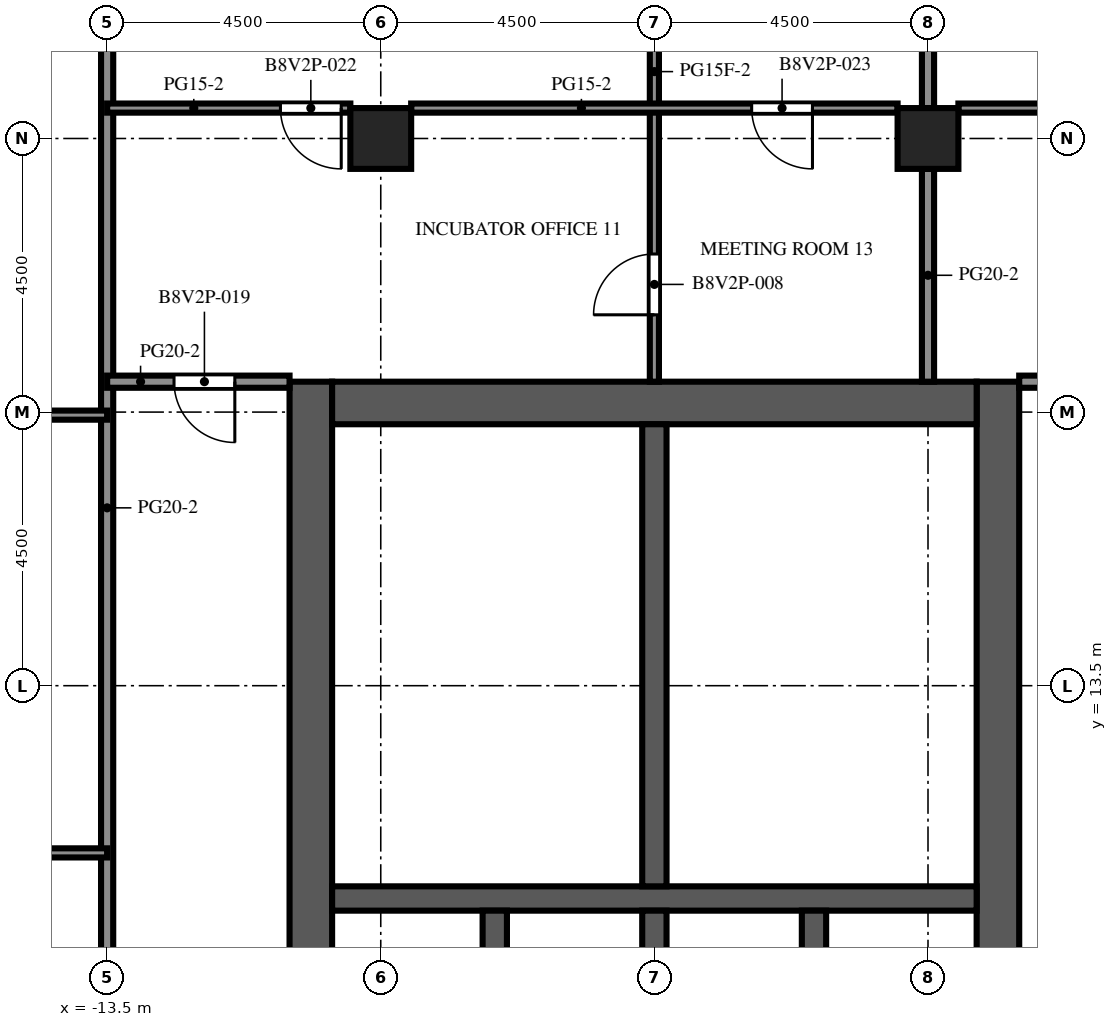
"""IFC4 building model, lengths in metres.
Left out: names, types, materials, properties, quantities, classifications, styles, units other than length and angle.
Written with IfcOpenShell. Run it as: python <this file> out.ifc"""

import sys

from ifc_helpers import new_model, si_unit, direction, frame, frame_2d, origin, origin_2d, place, context, subcontext, project, spatial, rectangle, extrude, element, fill, save


model = new_model("IFC4")
c1 = context("Model", 3, precision=1e-05, world=origin(), true_north=direction((0.0, 1.0)))
c2 = subcontext(c1, "Body", "Model", "MODEL_VIEW")
j1 = project(units=[si_unit("LENGTHUNIT", "METRE"), si_unit("PLANEANGLEUNIT", "RADIAN")], contexts=[c1])
p1 = place(None, origin())
s1 = spatial("IfcSite", under=j1, at=p1, CompositionType="ELEMENT")
p2 = place(p1, origin())
s2 = spatial("IfcBuilding", under=s1, at=p2, CompositionType="ELEMENT")
p3 = place(p2, frame((0.0, 0.0, 290.9)))
s3 = spatial("IfcBuildingStorey", under=s2, at=p3, CompositionType="ELEMENT", Elevation=290.9)
for number, where, z_axis, x_axis in (
    (1, (-9.0, 22.5, 0.0), (0.0, 0.0, 1.0), (1.0, 0.0, 0.0)),
    (2, (0.0, 22.5, 0.0), (0.0, 0.0, 1.0), (1.0, 0.0, 0.0)),
):
    element("IfcColumn", number, at=place(p3, frame(where, z_axis=z_axis, x_axis=x_axis)), inside=s3, PredefinedType="COLUMN", context=c2, shape_type="SweptSolid", body=[
        extrude(rectangle(XDim=1.0, YDim=1.0, at=origin_2d()), origin(), (0.0, 0.0, 1.0), 4.1),
    ])
p4 = place(p3, frame((-10.15, -9.0, 0.0), z_axis=(0.0, 0.0, 1.0), x_axis=(0.0, 1.0, 0.0)))
e3 = element("IfcWall", 3, at=p4, inside=s3, PredefinedType="SHEAR", context=c2, shape_type="SweptSolid", body=[
    extrude(rectangle(XDim=27.5, YDim=0.7, at=frame_2d((13.75, 0.0))), origin(), (0.0, 0.0, 1.0), 4.1),
])
p5 = place(p4, frame((12.55, 0.0, 0.0)))
e4 = element("IfcOpeningElement", 4, at=p5, cuts=e3, PredefinedType="OPENING", context=c2, shape_type="SweptSolid", body=[
    extrude(rectangle(XDim=2.4, YDim=2.4, at=frame_2d((1.2, 1.2))), frame((0.0, 0.36, 0.0), z_axis=(0.0, -1.0, 0.0), x_axis=(1.0, 0.0, 0.0)), (0.0, 0.0, 1.0), 0.72),
])
p6 = place(p4, frame((6.825, 0.0, 0.0)))
e5 = element("IfcOpeningElement", 5, at=p6, cuts=e3, PredefinedType="OPENING", context=c2, shape_type="SweptSolid", body=[
    extrude(rectangle(XDim=1.2, YDim=2.1, at=frame_2d((0.6, 1.05))), frame((0.0, 0.36, 0.0), z_axis=(0.0, -1.0, 0.0), x_axis=(1.0, 0.0, 0.0)), (0.0, 0.0, 1.0), 0.72),
])
p7 = place(p4, frame((19.475, 0.0, 0.0)))
e6 = element("IfcOpeningElement", 6, at=p7, cuts=e3, PredefinedType="OPENING", context=c2, shape_type="SweptSolid", body=[
    extrude(rectangle(XDim=1.2, YDim=2.1, at=frame_2d((0.6, 1.05))), frame((0.0, 0.36, 0.0), z_axis=(0.0, -1.0, 0.0), x_axis=(1.0, 0.0, 0.0)), (0.0, 0.0, 1.0), 0.72),
])
p8 = place(p3, frame((1.15, -9.0, 0.0), z_axis=(0.0, 0.0, 1.0), x_axis=(0.0, 1.0, 0.0)))
e7 = element("IfcWall", 7, at=p8, inside=s3, PredefinedType="SHEAR", context=c2, shape_type="SweptSolid", body=[
    extrude(rectangle(XDim=27.5, YDim=0.7, at=frame_2d((13.75, 0.0))), origin(), (0.0, 0.0, 1.0), 4.1),
])
p9 = place(p8, frame((12.55, 0.0, 0.0)))
e8 = element("IfcOpeningElement", 8, at=p9, cuts=e7, PredefinedType="OPENING", context=c2, shape_type="SweptSolid", body=[
    extrude(rectangle(XDim=2.4, YDim=2.4, at=frame_2d((1.2, 1.2))), frame((0.0, 0.36, 0.0), z_axis=(0.0, -1.0, 0.0), x_axis=(1.0, 0.0, 0.0)), (0.0, 0.0, 1.0), 0.72),
])
p10 = place(p8, frame((3.9, 0.0, 0.0)))
e9 = element("IfcOpeningElement", 9, at=p10, cuts=e7, PredefinedType="OPENING", context=c2, shape_type="SweptSolid", body=[
    extrude(rectangle(XDim=1.2, YDim=2.1, at=frame_2d((0.6, 1.05))), frame((0.0, 0.36, 0.0), z_axis=(0.0, -1.0, 0.0), x_axis=(1.0, 0.0, 0.0)), (0.0, 0.0, 1.0), 0.72),
])
p11 = place(p8, frame((22.4, 0.0, 0.0)))
e10 = element("IfcOpeningElement", 10, at=p11, cuts=e7, PredefinedType="OPENING", context=c2, shape_type="SweptSolid", body=[
    extrude(rectangle(XDim=1.2, YDim=2.1, at=frame_2d((0.6, 1.05))), frame((0.0, 0.36, 0.0), z_axis=(0.0, -1.0, 0.0), x_axis=(1.0, 0.0, 0.0)), (0.0, 0.0, 1.0), 0.72),
])
p12 = place(p3, frame((-9.8, 18.15, 0.0), z_axis=(0.0, 0.0, 1.0), x_axis=(1.0, 0.0, 0.0)))
e11 = element("IfcWall", 11, at=p12, inside=s3, PredefinedType="SHEAR", context=c2, shape_type="SweptSolid", body=[
    extrude(rectangle(XDim=10.6, YDim=0.7, at=frame_2d((5.3, 0.0))), origin(), (0.0, 0.0, 1.0), 4.1),
])
p13 = place(p3, frame((-9.8, 10.0, 0.0), z_axis=(0.0, 0.0, 1.0), x_axis=(1.0, 0.0, 0.0)))
e12 = element("IfcWall", 12, at=p13, inside=s3, PredefinedType="SHEAR", context=c2, shape_type="SweptSolid", body=[
    extrude(rectangle(XDim=10.6, YDim=0.4, at=frame_2d((5.3, 0.0))), origin(), (0.0, 0.0, 1.0), 4.1),
])
for number, where, z_axis, x_axis in (
    (13, (-7.125, 6.9, 0.0), (0.0, 0.0, 1.0), (0.0, 1.0, 0.0)),
    (14, (-4.5, 6.9, 0.0), (0.0, 0.0, 1.0), (0.0, 1.0, 0.0)),
    (15, (-1.875, 6.9, 0.0), (0.0, 0.0, 1.0), (0.0, 1.0, 0.0)),
):
    element("IfcWall", number, at=place(p3, frame(where, z_axis=z_axis, x_axis=x_axis)), inside=s3, PredefinedType="SHEAR", context=c2, shape_type="SweptSolid", body=[
        extrude(rectangle(XDim=2.9, YDim=0.4, at=frame_2d((1.45, 0.0))), origin(), (0.0, 0.0, 1.0), 4.1),
    ])
p14 = place(p3, frame((-4.5, 10.2, 0.0), z_axis=(0.0, 0.0, 1.0), x_axis=(0.0, 1.0, 0.0)))
e16 = element("IfcWall", 16, at=p14, inside=s3, PredefinedType="SHEAR", context=c2, shape_type="SweptSolid", body=[
    extrude(rectangle(XDim=7.6, YDim=0.4, at=frame_2d((3.8, 0.0))), origin(), (0.0, 0.0, 1.0), 4.1),
])
p15 = place(p3, frame((-0.6, 10.2, 0.0), z_axis=(0.0, 0.0, 1.0), x_axis=(0.0, 1.0, 0.0)))
e17 = element("IfcWall", 17, at=p15, inside=s3, PredefinedType="PARTITIONING", context=c2, shape_type="SweptSolid", body=[
    extrude(rectangle(XDim=2.28, YDim=0.1, at=frame_2d((1.14, 0.0))), origin(), (0.0, 0.0, 1.0), 3.5),
])
p16 = place(p15, frame((0.64, 0.0, 0.0)))
e18 = element("IfcOpeningElement", 18, at=p16, cuts=e17, PredefinedType="OPENING", context=c2, shape_type="SweptSolid", body=[
    extrude(rectangle(XDim=1.0, YDim=2.1, at=frame_2d((0.5, 1.05))), frame((0.0, 0.06, 0.0), z_axis=(0.0, -1.0, 0.0), x_axis=(1.0, 0.0, 0.0)), (0.0, 0.0, 1.0), 0.12),
])
p17 = place(p3, frame((-0.6, 12.48, 0.0), z_axis=(0.0, 0.0, 1.0), x_axis=(0.0, 1.0, 0.0)))
e19 = element("IfcWall", 19, at=p17, inside=s3, PredefinedType="PARTITIONING", context=c2, shape_type="SweptSolid", body=[
    extrude(rectangle(XDim=2.432, YDim=0.1, at=frame_2d((1.216, 0.0))), origin(), (0.0, 0.0, 1.0), 3.5),
])
p18 = place(p17, frame((0.716, 0.0, 0.0)))
e20 = element("IfcOpeningElement", 20, at=p18, cuts=e19, PredefinedType="OPENING", context=c2, shape_type="SweptSolid", body=[
    extrude(rectangle(XDim=1.0, YDim=2.1, at=frame_2d((0.5, 1.05))), frame((0.0, 0.06, 0.0), z_axis=(0.0, -1.0, 0.0), x_axis=(1.0, 0.0, 0.0)), (0.0, 0.0, 1.0), 0.12),
])
p19 = place(p3, frame((-0.6, 14.912, 0.0), z_axis=(0.0, 0.0, 1.0), x_axis=(0.0, 1.0, 0.0)))
e21 = element("IfcWall", 21, at=p19, inside=s3, PredefinedType="PARTITIONING", context=c2, shape_type="SweptSolid", body=[
    extrude(rectangle(XDim=2.888, YDim=0.1, at=frame_2d((1.444, 0.0))), origin(), (0.0, 0.0, 1.0), 3.5),
])
p20 = place(p19, frame((0.944, 0.0, 0.0)))
e22 = element("IfcOpeningElement", 22, at=p20, cuts=e21, PredefinedType="OPENING", context=c2, shape_type="SweptSolid", body=[
    extrude(rectangle(XDim=1.0, YDim=2.1, at=frame_2d((0.5, 1.05))), frame((0.0, 0.06, 0.0), z_axis=(0.0, -1.0, 0.0), x_axis=(1.0, 0.0, 0.0)), (0.0, 0.0, 1.0), 0.12),
])
for number, where, z_axis, x_axis in (
    (23, (-4.3, 12.48, 0.0), (0.0, 0.0, 1.0), (1.0, 0.0, 0.0)),
    (24, (-4.3, 14.912, 0.0), (0.0, 0.0, 1.0), (1.0, 0.0, 0.0)),
):
    element("IfcWall", number, at=place(p3, frame(where, z_axis=z_axis, x_axis=x_axis)), inside=s3, PredefinedType="PARTITIONING", context=c2, shape_type="SweptSolid", body=[
        extrude(rectangle(XDim=3.7, YDim=0.1, at=frame_2d((1.85, 0.0))), origin(), (0.0, 0.0, 1.0), 3.5),
    ])
p21 = place(p3, frame((-13.5, 6.25, 0.0), z_axis=(0.0, 0.0, 1.0), x_axis=(0.0, 1.0, 0.0)))
e25 = element("IfcWall", 25, at=p21, inside=s3, PredefinedType="PARTITIONING", context=c2, shape_type="SweptSolid", body=[
    extrude(rectangle(XDim=20.35, YDim=0.2, at=frame_2d((10.175, 0.0))), origin(), (0.0, 0.0, 1.0), 3.5),
])
p22 = place(p3, frame((-4.5, 26.6, 0.0), z_axis=(0.0, 0.0, 1.0), x_axis=(0.0, -1.0, 0.0)))
e26 = element("IfcWall", 26, at=p22, inside=s3, PredefinedType="PARTITIONING", context=c2, shape_type="SweptSolid", body=[
    extrude(rectangle(XDim=8.1, YDim=0.15, at=frame_2d((4.05, 0.0))), origin(), (0.0, 0.0, 1.0), 3.5),
])
p23 = place(p22, frame((6.0, 0.0, 0.0)))
e27 = element("IfcOpeningElement", 27, at=p23, cuts=e26, PredefinedType="OPENING", context=c2, shape_type="SweptSolid", body=[
    extrude(rectangle(XDim=1.0, YDim=2.1, at=frame_2d((0.5, 1.05))), frame((0.0, 0.085, 0.0), z_axis=(0.0, -1.0, 0.0), x_axis=(1.0, 0.0, 0.0)), (0.0, 0.0, 1.0), 0.17),
])
p24 = place(p3, frame((0.0, 18.5, 0.0), z_axis=(0.0, 0.0, 1.0), x_axis=(0.0, 1.0, 0.0)))
e28 = element("IfcWall", 28, at=p24, inside=s3, PredefinedType="PARTITIONING", context=c2, shape_type="SweptSolid", body=[
    extrude(rectangle(XDim=3.5, YDim=0.2, at=frame_2d((1.75, 0.0))), origin(), (0.0, 0.0, 1.0), 3.5),
])
p25 = place(p3, frame((0.0, 23.0, 0.0), z_axis=(0.0, 0.0, 1.0), x_axis=(0.0, 1.0, 0.0)))
e29 = element("IfcWall", 29, at=p25, inside=s3, PredefinedType="PARTITIONING", context=c2, shape_type="SweptSolid", body=[
    extrude(rectangle(XDim=3.6, YDim=0.2, at=frame_2d((1.8, 0.0))), origin(), (0.0, 0.0, 1.0), 3.5),
])
p26 = place(p3, frame((-22.35, 10.75, 0.0), z_axis=(0.0, 0.0, 1.0), x_axis=(1.0, 0.0, 0.0)))
e30 = element("IfcWall", 30, at=p26, inside=s3, PredefinedType="PARTITIONING", context=c2, shape_type="SweptSolid", body=[
    extrude(rectangle(XDim=8.85, YDim=0.15, at=frame_2d((4.425, 0.0))), origin(), (0.0, 0.0, 1.0), 3.5),
])
p27 = place(p26, frame((4.95, 0.0, 0.0)))
e31 = element("IfcOpeningElement", 31, at=p27, cuts=e30, PredefinedType="OPENING", context=c2, shape_type="SweptSolid", body=[
    extrude(rectangle(XDim=1.0, YDim=2.1, at=frame_2d((0.5, 1.05))), frame((0.0, 0.085, 0.0), z_axis=(0.0, -1.0, 0.0), x_axis=(1.0, 0.0, 0.0)), (0.0, 0.0, 1.0), 0.17),
])
p28 = place(p3, frame((-17.5, 17.95, 0.0), z_axis=(0.0, 0.0, 1.0), x_axis=(1.0, 0.0, 0.0)))
e32 = element("IfcWall", 32, at=p28, inside=s3, PredefinedType="PARTITIONING", context=c2, shape_type="SweptSolid", body=[
    extrude(rectangle(XDim=4.0, YDim=0.15, at=frame_2d((2.0, 0.0))), origin(), (0.0, 0.0, 1.0), 3.5),
])
p29 = place(p28, frame((0.1, 0.0, 0.0)))
e33 = element("IfcOpeningElement", 33, at=p29, cuts=e32, PredefinedType="OPENING", context=c2, shape_type="SweptSolid", body=[
    extrude(rectangle(XDim=1.0, YDim=2.1, at=frame_2d((0.5, 1.05))), frame((0.0, 0.085, 0.0), z_axis=(0.0, -1.0, 0.0), x_axis=(1.0, 0.0, 0.0)), (0.0, 0.0, 1.0), 0.17),
])
p30 = place(p3, frame((-13.5, 18.5, 0.0), z_axis=(0.0, 0.0, 1.0), x_axis=(1.0, 0.0, 0.0)))
e34 = element("IfcWall", 34, at=p30, inside=s3, PredefinedType="PARTITIONING", context=c2, shape_type="SweptSolid", body=[
    extrude(rectangle(XDim=3.0, YDim=0.2, at=frame_2d((1.5, 0.0))), origin(), (0.0, 0.0, 1.0), 3.5),
])
p31 = place(p30, frame((1.1, 0.0, 0.0)))
e35 = element("IfcOpeningElement", 35, at=p31, cuts=e34, PredefinedType="OPENING", context=c2, shape_type="SweptSolid", body=[
    extrude(rectangle(XDim=1.0, YDim=2.1, at=frame_2d((0.5, 1.05))), frame((0.0, 0.11, 0.0), z_axis=(0.0, -1.0, 0.0), x_axis=(1.0, 0.0, 0.0)), (0.0, 0.0, 1.0), 0.22),
])
p32 = place(p3, frame((1.5, 18.5, 0.0), z_axis=(0.0, 0.0, 1.0), x_axis=(1.0, 0.0, 0.0)))
e36 = element("IfcWall", 36, at=p32, inside=s3, PredefinedType="PARTITIONING", context=c2, shape_type="SweptSolid", body=[
    extrude(rectangle(XDim=4.5, YDim=0.2, at=frame_2d((2.25, 0.0))), origin(), (0.0, 0.0, 1.0), 3.5),
])
p33 = place(p32, frame((0.6, 0.0, 0.0)))
e37 = element("IfcOpeningElement", 37, at=p33, cuts=e36, PredefinedType="OPENING", context=c2, shape_type="SweptSolid", body=[
    extrude(rectangle(XDim=1.0, YDim=2.1, at=frame_2d((0.5, 1.05))), frame((0.0, 0.11, 0.0), z_axis=(0.0, -1.0, 0.0), x_axis=(1.0, 0.0, 0.0)), (0.0, 0.0, 1.0), 0.22),
])
p34 = place(p3, frame((-13.5, 23.0, 0.0), z_axis=(0.0, 0.0, 1.0), x_axis=(1.0, 0.0, 0.0)))
e38 = element("IfcWall", 38, at=p34, inside=s3, PredefinedType="PARTITIONING", context=c2, shape_type="SweptSolid", body=[
    extrude(rectangle(XDim=4.0, YDim=0.15, at=frame_2d((2.0, 0.0))), origin(), (0.0, 0.0, 1.0), 3.5),
])
p35 = place(p34, frame((2.85, 0.0, 0.0)))
e39 = element("IfcOpeningElement", 39, at=p35, cuts=e38, PredefinedType="OPENING", context=c2, shape_type="SweptSolid", body=[
    extrude(rectangle(XDim=1.0, YDim=2.1, at=frame_2d((0.5, 1.05))), frame((0.0, 0.085, 0.0), z_axis=(0.0, -1.0, 0.0), x_axis=(1.0, 0.0, 0.0)), (0.0, 0.0, 1.0), 0.17),
])
p36 = place(p3, frame((-8.5, 23.0, 0.0), z_axis=(0.0, 0.0, 1.0), x_axis=(1.0, 0.0, 0.0)))
e40 = element("IfcWall", 40, at=p36, inside=s3, PredefinedType="PARTITIONING", context=c2, shape_type="SweptSolid", body=[
    extrude(rectangle(XDim=8.0, YDim=0.15, at=frame_2d((4.0, 0.0))), origin(), (0.0, 0.0, 1.0), 3.5),
])
p37 = place(p36, frame((5.6, 0.0, 0.0)))
e41 = element("IfcOpeningElement", 41, at=p37, cuts=e40, PredefinedType="OPENING", context=c2, shape_type="SweptSolid", body=[
    extrude(rectangle(XDim=1.0, YDim=2.1, at=frame_2d((0.5, 1.05))), frame((0.0, 0.085, 0.0), z_axis=(0.0, -1.0, 0.0), x_axis=(1.0, 0.0, 0.0)), (0.0, 0.0, 1.0), 0.17),
])
p38 = place(p3, frame((0.5, 23.0, 0.0), z_axis=(0.0, 0.0, 1.0), x_axis=(1.0, 0.0, 0.0)))
e42 = element("IfcWall", 42, at=p38, inside=s3, PredefinedType="PARTITIONING", context=c2, shape_type="SweptSolid", body=[
    extrude(rectangle(XDim=8.0, YDim=0.15, at=frame_2d((4.0, 0.0))), origin(), (0.0, 0.0, 1.0), 3.5),
])
p39 = place(p38, frame((6.85, 0.0, 0.0)))
e43 = element("IfcOpeningElement", 43, at=p39, cuts=e42, PredefinedType="OPENING", context=c2, shape_type="SweptSolid", body=[
    extrude(rectangle(XDim=1.0, YDim=2.1, at=frame_2d((0.5, 1.05))), frame((0.0, 0.085, 0.0), z_axis=(0.0, -1.0, 0.0), x_axis=(1.0, 0.0, 0.0)), (0.0, 0.0, 1.0), 0.17),
])
p40 = place(p7, origin())
e44 = element("IfcDoor", 44, at=p40, inside=s3, OperationType="SINGLE_SWING_LEFT", PredefinedType="DOOR", context=c2, shape_type="SweptSolid", body=[
    extrude(rectangle(XDim=1.2, YDim=2.1, at=frame_2d((0.6, 1.05))), frame((0.0, 0.025, 0.0), z_axis=(0.0, -1.0, 0.0), x_axis=(1.0, 0.0, 0.0)), (0.0, 0.0, 1.0), 0.05),
])
fill(e6, e44)
p41 = place(p11, origin())
e45 = element("IfcDoor", 45, at=p41, inside=s3, OperationType="SINGLE_SWING_LEFT", PredefinedType="DOOR", context=c2, shape_type="SweptSolid", body=[
    extrude(rectangle(XDim=1.2, YDim=2.1, at=frame_2d((0.6, 1.05))), frame((0.0, 0.325, 0.0), z_axis=(0.0, -1.0, 0.0), x_axis=(1.0, 0.0, 0.0)), (0.0, 0.0, 1.0), 0.05),
])
fill(e10, e45)
p42 = place(p16, origin())
e46 = element("IfcDoor", 46, at=p42, inside=s3, OperationType="SINGLE_SWING_RIGHT", PredefinedType="DOOR", context=c2, shape_type="SweptSolid", body=[
    extrude(rectangle(XDim=1.0, YDim=2.1, at=frame_2d((0.5, 1.05))), frame((0.0, 0.025, 0.0), z_axis=(0.0, -1.0, 0.0), x_axis=(1.0, 0.0, 0.0)), (0.0, 0.0, 1.0), 0.05),
])
fill(e18, e46)
p43 = place(p18, origin())
e47 = element("IfcDoor", 47, at=p43, inside=s3, OperationType="SINGLE_SWING_LEFT", PredefinedType="DOOR", context=c2, shape_type="SweptSolid", body=[
    extrude(rectangle(XDim=1.0, YDim=2.1, at=frame_2d((0.5, 1.05))), frame((0.0, 0.025, 0.0), z_axis=(0.0, -1.0, 0.0), x_axis=(1.0, 0.0, 0.0)), (0.0, 0.0, 1.0), 0.05),
])
fill(e20, e47)
p44 = place(p20, origin())
e48 = element("IfcDoor", 48, at=p44, inside=s3, OperationType="SINGLE_SWING_RIGHT", PredefinedType="DOOR", context=c2, shape_type="SweptSolid", body=[
    extrude(rectangle(XDim=1.0, YDim=2.1, at=frame_2d((0.5, 1.05))), frame((0.0, 0.025, 0.0), z_axis=(0.0, -1.0, 0.0), x_axis=(1.0, 0.0, 0.0)), (0.0, 0.0, 1.0), 0.05),
])
fill(e22, e48)
p45 = place(p23, origin())
e49 = element("IfcDoor", 49, at=p45, inside=s3, OperationType="SINGLE_SWING_RIGHT", PredefinedType="DOOR", context=c2, shape_type="SweptSolid", body=[
    extrude(rectangle(XDim=1.0, YDim=2.1, at=frame_2d((0.5, 1.05))), frame((0.0, 0.025, 0.0), z_axis=(0.0, -1.0, 0.0), x_axis=(1.0, 0.0, 0.0)), (0.0, 0.0, 1.0), 0.05),
])
fill(e27, e49)
p46 = place(p31, origin())
e50 = element("IfcDoor", 50, at=p46, inside=s3, OperationType="SINGLE_SWING_RIGHT", PredefinedType="DOOR", context=c2, shape_type="SweptSolid", body=[
    extrude(rectangle(XDim=1.0, YDim=2.1, at=frame_2d((0.5, 1.05))), frame((0.0, 0.025, 0.0), z_axis=(0.0, -1.0, 0.0), x_axis=(1.0, 0.0, 0.0)), (0.0, 0.0, 1.0), 0.05),
])
fill(e35, e50)
p47 = place(p35, origin())
e51 = element("IfcDoor", 51, at=p47, inside=s3, OperationType="SINGLE_SWING_RIGHT", PredefinedType="DOOR", context=c2, shape_type="SweptSolid", body=[
    extrude(rectangle(XDim=1.0, YDim=2.1, at=frame_2d((0.5, 1.05))), frame((0.0, 0.025, 0.0), z_axis=(0.0, -1.0, 0.0), x_axis=(1.0, 0.0, 0.0)), (0.0, 0.0, 1.0), 0.05),
])
fill(e39, e51)
p48 = place(p37, origin())
e52 = element("IfcDoor", 52, at=p48, inside=s3, OperationType="SINGLE_SWING_RIGHT", PredefinedType="DOOR", context=c2, shape_type="SweptSolid", body=[
    extrude(rectangle(XDim=1.0, YDim=2.1, at=frame_2d((0.5, 1.05))), frame((0.0, 0.025, 0.0), z_axis=(0.0, -1.0, 0.0), x_axis=(1.0, 0.0, 0.0)), (0.0, 0.0, 1.0), 0.05),
])
fill(e41, e52)
save(model, sys.argv[1])
